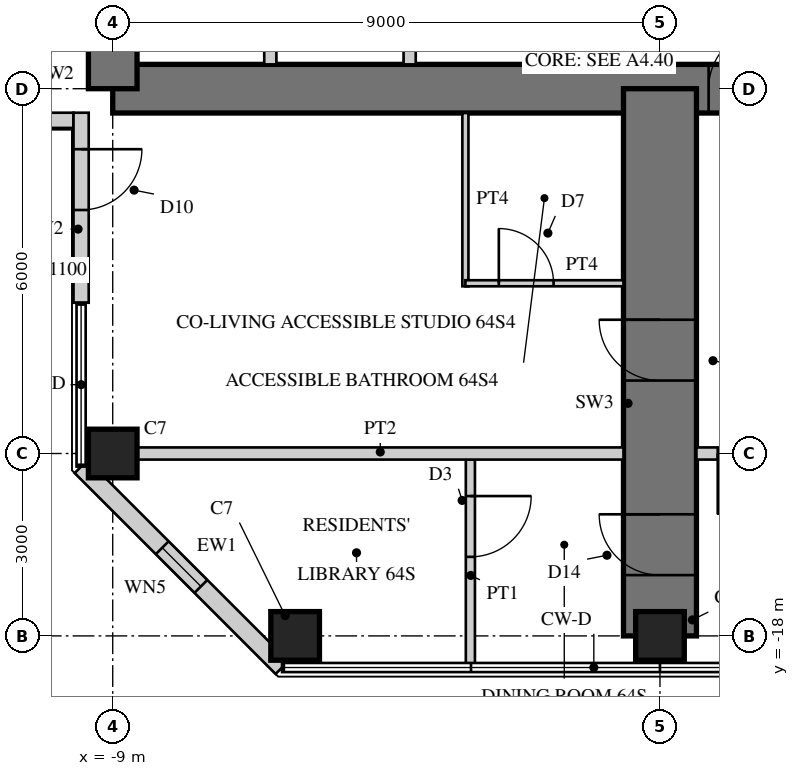
"""IFC4 building model, lengths in metres.
Left out: names, types, materials, properties, quantities, classifications, styles, units other than length and angle.
Written with IfcOpenShell. Run it as: python <this file> out.ifc"""

import sys

from ifc_helpers import new_model, si_unit, direction, frame, frame_2d, origin, origin_2d, place, context, subcontext, project, spatial, rectangle, hollow_rectangle, extrude, element, fill, save


model = new_model("IFC4")
c1 = context("Model", 3, precision=1e-05, world=origin(), true_north=direction((0.0, 1.0)))
c2 = subcontext(c1, "Body", "Model", "MODEL_VIEW")
j1 = project(units=[si_unit("LENGTHUNIT", "METRE"), si_unit("PLANEANGLEUNIT", "RADIAN")], contexts=[c1])
p1 = place(None, origin())
s1 = spatial("IfcSite", under=j1, at=p1, CompositionType="ELEMENT")
p2 = place(p1, origin())
s2 = spatial("IfcBuilding", under=s1, at=p2, CompositionType="ELEMENT")
p3 = place(p2, frame((0.0, 0.0, 249.3)))
s3 = spatial("IfcBuildingStorey", under=s2, at=p3, CompositionType="ELEMENT", Elevation=249.3)
p4 = place(p3, frame((-9.0, -9.0, 0.0), z_axis=(0.0, 0.0, 1.0), x_axis=(1.0, 0.0, 0.0)))
e1 = element("IfcWall", 1, at=p4, inside=s3, PredefinedType="SHEAR", context=c2, shape_type="SweptSolid", body=[
    extrude(rectangle(XDim=18.0, YDim=0.8, at=frame_2d((9.0, 0.0))), origin(), (0.0, 0.0, 1.0), 3.4),
])
p5 = place(p4, frame((9.8, 0.0, 0.0)))
e2 = element("IfcOpeningElement", 2, at=p5, cuts=e1, PredefinedType="OPENING", context=c2, shape_type="SweptSolid", body=[
    extrude(rectangle(XDim=1.0, YDim=2.4, at=frame_2d((0.5, 1.2))), frame((0.0, 0.41, 0.0), z_axis=(0.0, -1.0, 0.0), x_axis=(1.0, 0.0, 0.0)), (0.0, 0.0, 1.0), 0.82),
])
p6 = place(p3, frame((-9.0, 9.0, 0.0), z_axis=(0.0, 0.0, 1.0), x_axis=(0.0, -1.0, 0.0)))
e3 = element("IfcWall", 3, at=p6, inside=s3, PredefinedType="SHEAR", context=c2, shape_type="SweptSolid", body=[
    extrude(rectangle(XDim=18.0, YDim=0.8, at=frame_2d((9.0, 0.0))), origin(), (0.0, 0.0, 1.0), 3.4),
])
p7 = place(p6, frame((9.8, 0.0, 0.0)))
e4 = element("IfcOpeningElement", 4, at=p7, cuts=e3, PredefinedType="OPENING", context=c2, shape_type="SweptSolid", body=[
    extrude(rectangle(XDim=1.0, YDim=2.4, at=frame_2d((0.5, 1.2))), frame((0.0, 0.41, 0.0), z_axis=(0.0, -1.0, 0.0), x_axis=(1.0, 0.0, 0.0)), (0.0, 0.0, 1.0), 0.82),
])
p8 = place(p3, frame((-1.8, -1.875, 0.0), z_axis=(0.0, 0.0, 1.0), x_axis=(0.0, -1.0, 0.0)))
e5 = element("IfcWall", 5, at=p8, inside=s3, PredefinedType="SHEAR", context=c2, shape_type="SweptSolid", body=[
    extrude(rectangle(XDim=6.725, YDim=0.25, at=frame_2d((3.363, 0.0))), origin(), (0.0, 0.0, 1.0), 3.4),
])
p9 = place(p8, frame((1.875, 0.0, 0.0)))
e6 = element("IfcOpeningElement", 6, at=p9, cuts=e5, PredefinedType="OPENING", context=c2, shape_type="SweptSolid", body=[
    extrude(rectangle(XDim=1.6, YDim=2.4, at=frame_2d((0.8, 1.2))), frame((0.0, 0.135, 0.0), z_axis=(0.0, -1.0, 0.0), x_axis=(1.0, 0.0, 0.0)), (0.0, 0.0, 1.0), 0.27),
])
for number, where, z_axis, x_axis in (
    (7, (-4.117, -5.975, 0.0), (0.0, 0.0, 1.0), (0.0, -1.0, 0.0)),
    (8, (-6.408, -5.975, 0.0), (0.0, 0.0, 1.0), (0.0, -1.0, 0.0)),
):
    element("IfcWall", number, at=place(p3, frame(where, z_axis=z_axis, x_axis=x_axis)), inside=s3, PredefinedType="PARTITIONING", context=c2, shape_type="SweptSolid", body=[
        extrude(rectangle(XDim=2.625, YDim=0.2, at=frame_2d((1.312, 0.0))), origin(), (0.0, 0.0, 1.0), 3.4),
    ])
p10 = place(p3, frame((0.0, -9.0, 0.0), z_axis=(0.0, 0.0, 1.0), x_axis=(0.0, -1.0, 0.0)))
e9 = element("IfcWall", 9, at=p10, inside=s3, PredefinedType="SHEAR", context=c2, shape_type="SweptSolid", body=[
    extrude(rectangle(XDim=9.0, YDim=1.2, at=frame_2d((4.5, 0.0))), origin(), (0.0, 0.0, 1.0), 3.4),
])
p11 = place(p10, frame((3.8, 0.0, 0.0)))
e10 = element("IfcOpeningElement", 10, at=p11, cuts=e9, PredefinedType="OPENING", context=c2, shape_type="SweptSolid", body=[
    extrude(rectangle(XDim=1.0, YDim=2.15, at=frame_2d((0.5, 1.075))), frame((0.0, 0.61, 0.0), z_axis=(0.0, -1.0, 0.0), x_axis=(1.0, 0.0, 0.0)), (0.0, 0.0, 1.0), 1.22),
])
p12 = place(p10, frame((7.0, 0.0, 0.0)))
e11 = element("IfcOpeningElement", 11, at=p12, cuts=e9, PredefinedType="OPENING", context=c2, shape_type="SweptSolid", body=[
    extrude(rectangle(XDim=1.0, YDim=2.2, at=frame_2d((0.5, 1.1))), frame((0.0, 0.61, 0.0), z_axis=(0.0, -1.0, 0.0), x_axis=(1.0, 0.0, 0.0)), (0.0, 0.0, 1.0), 1.22),
])
for number, where, z_axis, x_axis in (
    (12, (-9.0, -15.0, 0.0), (0.0, 0.0, 1.0), (1.0, 0.0, 0.0)),
    (13, (-6.0, -18.0, 0.0), (0.0, 0.0, 1.0), (1.0, 0.0, 0.0)),
    (14, (0.0, -18.0, 0.0), (0.0, 0.0, 1.0), (1.0, 0.0, 0.0)),
):
    element("IfcColumn", number, at=place(p3, frame(where, z_axis=z_axis, x_axis=x_axis)), inside=s3, PredefinedType="COLUMN", context=c2, shape_type="SweptSolid", body=[
        extrude(rectangle(XDim=0.8, YDim=0.8, at=origin_2d()), origin(), (0.0, 0.0, 1.0), 3.4),
    ])
p13 = place(p3, frame((-12.52, -9.52, 0.0), z_axis=(0.0, 0.0, 1.0), x_axis=(1.0, 0.0, 0.0)))
e15 = element("IfcWall", 15, at=p13, inside=s3, PredefinedType="SOLIDWALL", context=c2, shape_type="SweptSolid", body=[
    extrude(rectangle(XDim=2.875, YDim=0.25, at=frame_2d((1.438, 0.0))), origin(), (0.0, 0.0, 1.0), 3.15),
])
p14 = place(p13, frame((0.6, 0.0, 0.0)))
e16 = element("IfcOpeningElement", 16, at=p14, cuts=e15, PredefinedType="OPENING", context=c2, shape_type="SweptSolid", body=[
    extrude(rectangle(XDim=1.0, YDim=2.2, at=frame_2d((0.5, 1.1))), frame((0.0, 0.135, 0.0), z_axis=(0.0, -1.0, 0.0), x_axis=(1.0, 0.0, 0.0)), (0.0, 0.0, 1.0), 0.27),
])
p15 = place(p3, frame((-9.52, -9.395, 0.0), z_axis=(0.0, 0.0, 1.0), x_axis=(0.0, -1.0, 0.0)))
e17 = element("IfcWall", 17, at=p15, inside=s3, PredefinedType="SOLIDWALL", context=c2, shape_type="SweptSolid", body=[
    extrude(rectangle(XDim=3.125, YDim=0.25, at=frame_2d((1.562, 0.0))), origin(), (0.0, 0.0, 1.0), 3.15),
])
p16 = place(p15, frame((0.6, 0.0, 0.0)))
e18 = element("IfcOpeningElement", 18, at=p16, cuts=e17, PredefinedType="OPENING", context=c2, shape_type="SweptSolid", body=[
    extrude(rectangle(XDim=1.0, YDim=2.2, at=frame_2d((0.5, 1.1))), frame((0.0, 0.135, 0.0), z_axis=(0.0, -1.0, 0.0), x_axis=(1.0, 0.0, 0.0)), (0.0, 0.0, 1.0), 0.27),
])
p17 = place(p3, frame((-9.52, -15.215, 0.0), z_axis=(0.0, 0.0, 1.0), x_axis=(0.707106781187, -0.707106781187, 0.0)))
e19 = element("IfcWall", 19, at=p17, inside=s3, PredefinedType="SOLIDWALL", context=c2, shape_type="SweptSolid", body=[
    extrude(rectangle(XDim=4.674, YDim=0.3, at=frame_2d((2.337, 0.0))), origin(), (0.0, 0.0, 1.0), 3.15),
])
p18 = place(p17, frame((1.887, 0.0, 0.3)))
e20 = element("IfcOpeningElement", 20, at=p18, cuts=e19, PredefinedType="OPENING", context=c2, shape_type="SweptSolid", body=[
    extrude(rectangle(XDim=0.9, YDim=2.4, at=frame_2d((0.45, 1.2))), frame((0.0, 0.16, 0.0), z_axis=(0.0, -1.0, 0.0), x_axis=(1.0, 0.0, 0.0)), (0.0, 0.0, 1.0), 0.32),
])
p19 = place(p3, frame((-3.2, -9.4, 0.0), z_axis=(0.0, 0.0, 1.0), x_axis=(0.0, -1.0, 0.0)))
e21 = element("IfcWall", 21, at=p19, inside=s3, PredefinedType="PARTITIONING", context=c2, shape_type="SweptSolid", body=[
    extrude(rectangle(XDim=2.85, YDim=0.1, at=frame_2d((1.425, 0.0))), origin(), (0.0, 0.0, 1.0), 3.15),
])
p20 = place(p3, frame((-3.2, -12.2, 0.0), z_axis=(0.0, 0.0, 1.0), x_axis=(1.0, 0.0, 0.0)))
e22 = element("IfcWall", 22, at=p20, inside=s3, PredefinedType="PARTITIONING", context=c2, shape_type="SweptSolid", body=[
    extrude(rectangle(XDim=2.6, YDim=0.1, at=frame_2d((1.3, 0.0))), origin(), (0.0, 0.0, 1.0), 3.15),
])
p21 = place(p20, frame((0.55, 0.0, 0.0)))
e23 = element("IfcOpeningElement", 23, at=p21, cuts=e22, PredefinedType="OPENING", context=c2, shape_type="SweptSolid", body=[
    extrude(rectangle(XDim=0.9, YDim=2.1, at=frame_2d((0.45, 1.05))), frame((0.0, 0.06, 0.0), z_axis=(0.0, -1.0, 0.0), x_axis=(1.0, 0.0, 0.0)), (0.0, 0.0, 1.0), 0.12),
])
p22 = place(p3, frame((-3.118, -15.1, 0.0), z_axis=(0.0, 0.0, 1.0), x_axis=(0.0, -1.0, 0.0)))
e24 = element("IfcWall", 24, at=p22, inside=s3, PredefinedType="PARTITIONING", context=c2, shape_type="SweptSolid", body=[
    extrude(rectangle(XDim=3.38, YDim=0.15, at=frame_2d((1.69, 0.0))), origin(), (0.0, 0.0, 1.0), 3.15),
])
p23 = place(p22, frame((0.6, 0.0, 0.0)))
e25 = element("IfcOpeningElement", 25, at=p23, cuts=e24, PredefinedType="OPENING", context=c2, shape_type="SweptSolid", body=[
    extrude(rectangle(XDim=1.0, YDim=2.1, at=frame_2d((0.5, 1.05))), frame((0.0, 0.085, 0.0), z_axis=(0.0, -1.0, 0.0), x_axis=(1.0, 0.0, 0.0)), (0.0, 0.0, 1.0), 0.17),
])
p24 = place(p3, frame((-8.6, -15.0, 0.0), z_axis=(0.0, 0.0, 1.0), x_axis=(1.0, 0.0, 0.0)))
e26 = element("IfcWall", 26, at=p24, inside=s3, PredefinedType="SOLIDWALL", context=c2, shape_type="SweptSolid", body=[
    extrude(rectangle(XDim=8.0, YDim=0.2, at=frame_2d((4.0, 0.0))), origin(), (0.0, 0.0, 1.0), 2.1),
])
p25 = place(p3, frame((0.6, -15.0, 0.0), z_axis=(0.0, 0.0, 1.0), x_axis=(1.0, 0.0, 0.0)))
e27 = element("IfcWall", 27, at=p25, inside=s3, PredefinedType="SOLIDWALL", context=c2, shape_type="SweptSolid", body=[
    extrude(rectangle(XDim=8.0, YDim=0.2, at=frame_2d((4.0, 0.0))), origin(), (0.0, 0.0, 1.0), 2.1),
])
p26 = place(p25, frame((0.35, 0.0, 0.0)))
e28 = element("IfcOpeningElement", 28, at=p26, cuts=e27, PredefinedType="OPENING", context=c2, shape_type="SweptSolid", body=[
    extrude(rectangle(XDim=1.0, YDim=2.0, at=frame_2d((0.5, 1.0))), frame((0.0, 0.11, 0.0), z_axis=(0.0, -1.0, 0.0), x_axis=(1.0, 0.0, 0.0)), (0.0, 0.0, 1.0), 0.22),
])
p27 = place(p16, origin())
e29 = element("IfcDoor", 29, at=p27, inside=s3, OperationType="SINGLE_SWING_LEFT", PredefinedType="DOOR", context=c2, shape_type="SweptSolid", body=[
    extrude(hollow_rectangle(XDim=1.0, YDim=2.2, WallThickness=0.06, at=frame_2d((0.5, 1.1))), frame((0.0, 0.025, 0.0), z_axis=(0.0, -1.0, 0.0), x_axis=(1.0, 0.0, 0.0)), (0.0, 0.0, 1.0), 0.05),
    extrude(rectangle(XDim=0.879, YDim=2.079, at=frame_2d((0.5, 1.1))), frame((0.0, 0.025, 0.0), z_axis=(0.0, -1.0, 0.0), x_axis=(1.0, 0.0, 0.0)), (0.0, 0.0, 1.0), 0.05),
])
fill(e18, e29)
p28 = place(p18, origin())
e30 = element("IfcWindow", 30, at=p28, inside=s3, PartitioningType="SINGLE_PANEL", PredefinedType="WINDOW", context=c2, shape_type="SweptSolid", body=[
    extrude(hollow_rectangle(XDim=0.9, YDim=2.4, WallThickness=0.06, at=frame_2d((0.45, 1.2))), frame((0.0, 0.03, 0.0), z_axis=(0.0, -1.0, 0.0), x_axis=(1.0, 0.0, 0.0)), (0.0, 0.0, 1.0), 0.06),
    extrude(rectangle(XDim=0.779, YDim=2.279, at=frame_2d((0.45, 1.2))), frame((0.0, 0.03, 0.0), z_axis=(0.0, -1.0, 0.0), x_axis=(1.0, 0.0, 0.0)), (0.0, 0.0, 1.0), 0.06),
])
fill(e20, e30)
p29 = place(p21, origin())
e31 = element("IfcDoor", 31, at=p29, inside=s3, OperationType="SINGLE_SWING_LEFT", PredefinedType="DOOR", context=c2, shape_type="SweptSolid", body=[
    extrude(rectangle(XDim=0.9, YDim=2.1, at=frame_2d((0.45, 1.05))), frame((0.0, 0.025, 0.0), z_axis=(0.0, -1.0, 0.0), x_axis=(1.0, 0.0, 0.0)), (0.0, 0.0, 1.0), 0.05),
])
fill(e23, e31)
p30 = place(p23, origin())
e32 = element("IfcDoor", 32, at=p30, inside=s3, OperationType="SINGLE_SWING_LEFT", PredefinedType="DOOR", context=c2, shape_type="SweptSolid", body=[
    extrude(rectangle(XDim=1.0, YDim=2.1, at=frame_2d((0.5, 1.05))), frame((0.0, 0.025, 0.0), z_axis=(0.0, -1.0, 0.0), x_axis=(1.0, 0.0, 0.0)), (0.0, 0.0, 1.0), 0.05),
])
fill(e25, e32)
p31 = place(p26, frame((1.0, 0.0, 0.0), z_axis=(0.0, 0.0, 1.0), x_axis=(-1.0, 0.0, 0.0)))
e33 = element("IfcDoor", 33, at=p31, inside=s3, OperationType="SINGLE_SWING_RIGHT", PredefinedType="DOOR", context=c2, shape_type="SweptSolid", body=[
    extrude(rectangle(XDim=1.0, YDim=2.0, at=frame_2d((0.5, 1.0))), frame((0.0, 0.025, 0.0), z_axis=(0.0, -1.0, 0.0), x_axis=(1.0, 0.0, 0.0)), (0.0, 0.0, 1.0), 0.05),
])
fill(e28, e33)
p32 = place(p11, frame((1.0, 0.0, 0.0), z_axis=(0.0, 0.0, 1.0), x_axis=(-1.0, 0.0, 0.0)))
e34 = element("IfcDoor", 34, at=p32, inside=s3, OperationType="SINGLE_SWING_RIGHT", PredefinedType="DOOR", context=c2, shape_type="SweptSolid", body=[
    extrude(rectangle(XDim=1.0, YDim=2.15, at=frame_2d((0.5, 1.075))), frame((0.0, 0.025, 0.0), z_axis=(0.0, -1.0, 0.0), x_axis=(1.0, 0.0, 0.0)), (0.0, 0.0, 1.0), 0.05),
])
fill(e10, e34)
p33 = place(p12, frame((1.0, 0.0, 0.0), z_axis=(0.0, 0.0, 1.0), x_axis=(-1.0, 0.0, 0.0)))
e35 = element("IfcDoor", 35, at=p33, inside=s3, OperationType="SINGLE_SWING_RIGHT", PredefinedType="DOOR", context=c2, shape_type="SweptSolid", body=[
    extrude(rectangle(XDim=1.0, YDim=2.2, at=frame_2d((0.5, 1.1))), frame((0.0, 0.025, 0.0), z_axis=(0.0, -1.0, 0.0), x_axis=(1.0, 0.0, 0.0)), (0.0, 0.0, 1.0), 0.05),
])
fill(e11, e35)
p34 = place(p5, origin())
e36 = element("IfcDoor", 36, at=p34, inside=s3, OperationType="SINGLE_SWING_RIGHT", PredefinedType="DOOR", context=c2, shape_type="SweptSolid", body=[
    extrude(rectangle(XDim=1.0, YDim=2.4, at=frame_2d((0.5, 1.2))), frame((0.0, 0.055, 0.0), z_axis=(0.0, -1.0, 0.0), x_axis=(1.0, 0.0, 0.0)), (0.0, 0.0, 1.0), 0.05),
])
fill(e2, e36)
save(model, sys.argv[1])
